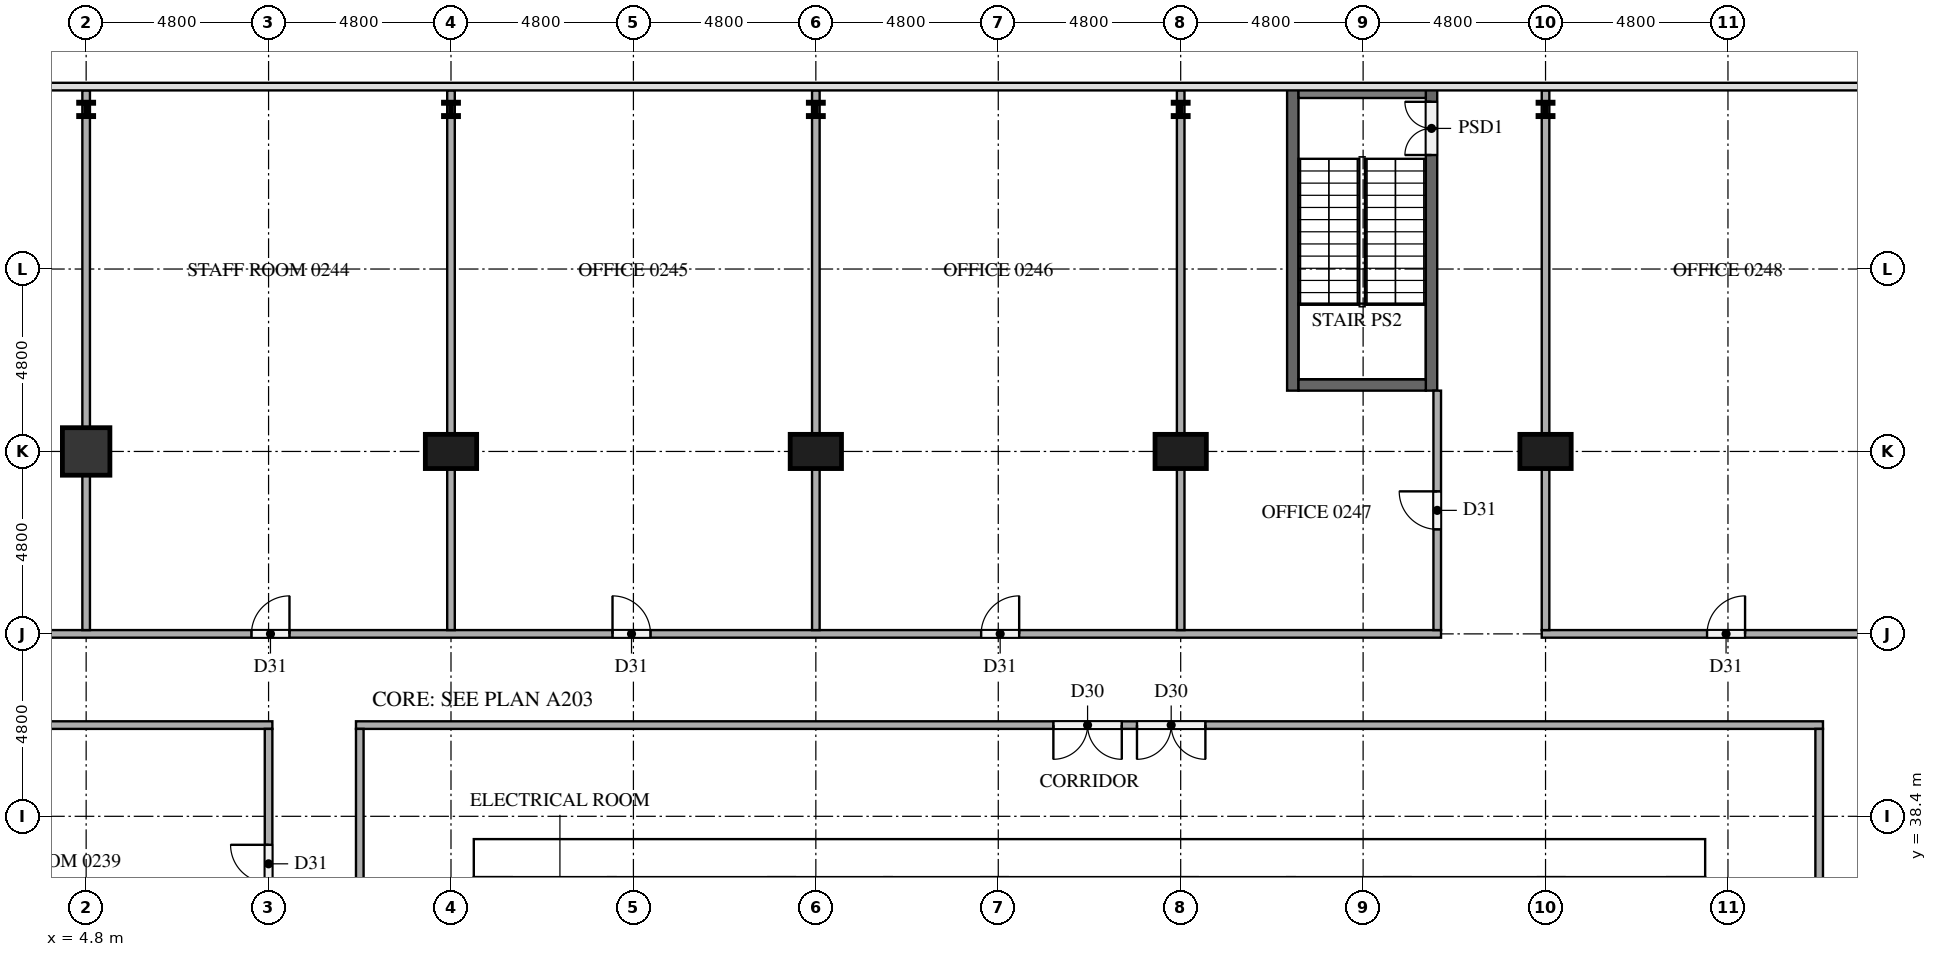
"""IFC4 building model, lengths in metres.
Left out: names, types, materials, properties, quantities, classifications, styles, units other than length and angle.
Written with IfcOpenShell. Run it as: python <this file> out.ifc"""

import sys

from ifc_helpers import new_model, si_unit, direction, frame, frame_2d, origin, origin_2d, place, context, subcontext, project, spatial, rectangle, i_section, extrude, element, fill, save


model = new_model("IFC4")
c1 = context("Model", 3, precision=1e-05, world=origin(), true_north=direction((0.0, 1.0)))
c2 = subcontext(c1, "Body", "Model", "MODEL_VIEW")
j1 = project(units=[si_unit("LENGTHUNIT", "METRE"), si_unit("PLANEANGLEUNIT", "RADIAN")], contexts=[c1])
p1 = place(None, origin())
s1 = spatial("IfcSite", under=j1, at=p1, CompositionType="ELEMENT")
p2 = place(p1, origin())
s2 = spatial("IfcBuilding", under=s1, at=p2, CompositionType="ELEMENT")
p3 = place(p2, frame((0.0, 0.0, 10.5)))
s3 = spatial("IfcBuildingStorey", under=s2, at=p3, CompositionType="ELEMENT", Elevation=10.5)
p4 = place(p3, frame((36.55, 49.6, 0.0), z_axis=(0.0, 0.0, 1.0), x_axis=(0.0, 1.0, 0.0)))
e1 = element("IfcWall", 1, at=p4, inside=s3, PredefinedType="SOLIDWALL", context=c2, shape_type="SweptSolid", body=[
    extrude(rectangle(XDim=8.0, YDim=0.3, at=frame_2d((4.0, 0.0))), origin(), (0.0, 0.0, 1.0), 4.2),
])
p5 = place(p3, frame((40.2, 49.6, 0.0), z_axis=(0.0, 0.0, 1.0), x_axis=(0.0, 1.0, 0.0)))
e2 = element("IfcWall", 2, at=p5, inside=s3, PredefinedType="SOLIDWALL", context=c2, shape_type="SweptSolid", body=[
    extrude(rectangle(XDim=8.0, YDim=0.3, at=frame_2d((4.0, 0.0))), origin(), (0.0, 0.0, 1.0), 4.2),
])
p6 = place(p5, frame((6.2, 0.0, 0.0)))
e3 = element("IfcOpeningElement", 3, at=p6, cuts=e2, PredefinedType="OPENING", context=c2, shape_type="SweptSolid", body=[
    extrude(rectangle(XDim=1.4, YDim=2.1, at=frame_2d((0.7, 1.05))), frame((0.0, 0.16, 0.0), z_axis=(0.0, -1.0, 0.0), x_axis=(1.0, 0.0, 0.0)), (0.0, 0.0, 1.0), 0.32),
])
for number, where, z_axis, x_axis in (
    (4, (36.7, 49.75, 0.0), (0.0, 0.0, 1.0), (1.0, 0.0, 0.0)),
    (5, (36.7, 57.45, 0.0), (0.0, 0.0, 1.0), (1.0, 0.0, 0.0)),
):
    element("IfcWall", number, at=place(p3, frame(where, z_axis=z_axis, x_axis=x_axis)), inside=s3, PredefinedType="SOLIDWALL", context=c2, shape_type="SweptSolid", body=[
        extrude(rectangle(XDim=3.35, YDim=0.3, at=frame_2d((1.675, 0.0))), origin(), (0.0, 0.0, 1.0), 4.2),
    ])
p7 = place(p3, frame((15.0, 37.3, 0.0), z_axis=(0.0, 0.0, 1.0), x_axis=(1.0, 0.0, 0.0)))
e6 = element("IfcWall", 6, at=p7, inside=s3, PredefinedType="SHEAR", context=c2, shape_type="SweptSolid", body=[
    extrude(rectangle(XDim=32.4, YDim=1.0, at=frame_2d((16.2, 0.0))), origin(), (0.0, 0.0, 1.0), 4.2),
])
p8 = place(p7, frame((15.3, 0.0, 0.0)))
e7 = element("IfcOpeningElement", 7, at=p8, cuts=e6, PredefinedType="OPENING", context=c2, shape_type="SweptSolid", body=[
    extrude(rectangle(XDim=1.8, YDim=2.1, at=frame_2d((0.9, 1.05))), frame((0.0, 0.51, 0.0), z_axis=(0.0, -1.0, 0.0), x_axis=(1.0, 0.0, 0.0)), (0.0, 0.0, 1.0), 1.02),
])
p9 = place(p7, frame((1.766, 0.0, 0.0)))
e8 = element("IfcOpeningElement", 8, at=p9, cuts=e6, PredefinedType="OPENING", context=c2, shape_type="SweptSolid", body=[
    extrude(rectangle(XDim=1.0, YDim=2.1, at=frame_2d((0.5, 1.05))), frame((0.0, 0.51, 0.0), z_axis=(0.0, -1.0, 0.0), x_axis=(1.0, 0.0, 0.0)), (0.0, 0.0, 1.0), 1.02),
])
p10 = place(p7, frame((5.241, 0.0, 0.0)))
e9 = element("IfcOpeningElement", 9, at=p10, cuts=e6, PredefinedType="OPENING", context=c2, shape_type="SweptSolid", body=[
    extrude(rectangle(XDim=1.0, YDim=2.1, at=frame_2d((0.5, 1.05))), frame((0.0, 0.51, 0.0), z_axis=(0.0, -1.0, 0.0), x_axis=(1.0, 0.0, 0.0)), (0.0, 0.0, 1.0), 1.02),
])
for number, where, z_axis, x_axis in (
    (10, (28.7, 33.9, 0.0), (0.0, 0.0, 1.0), (0.0, 1.0, 0.0)),
    (11, (33.7, 33.9, 0.0), (0.0, 0.0, 1.0), (0.0, 1.0, 0.0)),
):
    element("IfcWall", number, at=place(p3, frame(where, z_axis=z_axis, x_axis=x_axis)), inside=s3, PredefinedType="SHEAR", context=c2, shape_type="SweptSolid", body=[
        extrude(rectangle(XDim=2.9, YDim=0.7, at=frame_2d((1.45, 0.0))), origin(), (0.0, 0.0, 1.0), 4.2),
    ])
for number, where, z_axis, x_axis in (
    (12, (43.2, 48.0, 0.0), (0.0, 0.0, 1.0), (1.0, 0.0, 0.0)),
    (13, (33.6, 48.0, 0.0), (0.0, 0.0, 1.0), (1.0, 0.0, 0.0)),
    (14, (24.0, 48.0, 0.0), (0.0, 0.0, 1.0), (1.0, 0.0, 0.0)),
    (15, (14.4, 48.0, 0.0), (0.0, 0.0, 1.0), (1.0, 0.0, 0.0)),
):
    element("IfcColumn", number, at=place(p3, frame(where, z_axis=z_axis, x_axis=x_axis)), inside=s3, PredefinedType="COLUMN", context=c2, shape_type="SweptSolid", body=[
        extrude(rectangle(XDim=1.35, YDim=0.9, at=origin_2d()), origin(), (0.0, 0.0, 1.0), 4.2),
    ])
p11 = place(p3, frame((4.8, 48.0, 0.0), z_axis=(0.0, 0.0, 1.0), x_axis=(1.0, 0.0, 0.0)))
e16 = element("IfcColumn", 16, at=p11, inside=s3, PredefinedType="COLUMN", context=c2, shape_type="SweptSolid", body=[
    extrude(rectangle(XDim=1.25, YDim=1.25, at=origin_2d()), origin(), (0.0, 0.0, 1.0), 4.2),
])
for number, where, z_axis, x_axis in (
    (17, (4.8, 57.0, 0.0), (0.0, 0.0, 1.0), (1.0, 0.0, 0.0)),
    (18, (14.4, 57.0, 0.0), (0.0, 0.0, 1.0), (1.0, 0.0, 0.0)),
    (19, (24.0, 57.0, 0.0), (0.0, 0.0, 1.0), (1.0, 0.0, 0.0)),
    (20, (33.6, 57.0, 0.0), (0.0, 0.0, 1.0), (1.0, 0.0, 0.0)),
    (21, (43.2, 57.0, 0.0), (0.0, 0.0, 1.0), (1.0, 0.0, 0.0)),
):
    element("IfcColumn", number, at=place(p3, frame(where, z_axis=z_axis, x_axis=x_axis)), inside=s3, PredefinedType="COLUMN", context=c2, shape_type="SweptSolid", body=[
        extrude(i_section(OverallWidth=0.396, OverallDepth=0.381, WebThickness=0.019, FlangeThickness=0.03, at=origin_2d()), origin(), (0.0, 0.0, 1.0), 4.2),
    ])
for number, where, z_axis, x_axis in (
    (22, (25.9, 33.9, 0.0), (0.0, 0.0, 1.0), (0.0, 1.0, 0.0)),
    (23, (36.5, 33.9, 0.0), (0.0, 0.0, 1.0), (0.0, 1.0, 0.0)),
):
    element("IfcWall", number, at=place(p3, frame(where, z_axis=z_axis, x_axis=x_axis)), inside=s3, PredefinedType="SOLIDWALL", context=c2, shape_type="SweptSolid", body=[
        extrude(rectangle(XDim=2.9, YDim=0.2, at=frame_2d((1.45, 0.0))), origin(), (0.0, 0.0, 1.0), 4.2),
    ])
p12 = place(p3, frame((18.633, 31.6, 0.0), z_axis=(0.0, 0.0, 1.0), x_axis=(0.0, 1.0, 0.0)))
e24 = element("IfcWall", 24, at=p12, inside=s3, PredefinedType="PARTITIONING", context=c2, shape_type="SweptSolid", body=[
    extrude(rectangle(XDim=5.2, YDim=0.2, at=frame_2d((2.6, 0.0))), origin(), (0.0, 0.0, 1.0), 4.2),
])
p13 = place(p3, frame((-4.9, 40.8, 0.0), z_axis=(0.0, 0.0, 1.0), x_axis=(1.0, 0.0, 0.0)))
e25 = element("IfcWall", 25, at=p13, inside=s3, PredefinedType="PARTITIONING", context=c2, shape_type="SweptSolid", body=[
    extrude(rectangle(XDim=14.6, YDim=0.2, at=frame_2d((7.3, 0.0))), origin(), (0.0, 0.0, 1.0), 4.2),
])
p14 = place(p3, frame((50.5, 40.8, 0.0), z_axis=(0.0, 0.0, 1.0), x_axis=(-1.0, 0.0, 0.0)))
e26 = element("IfcWall", 26, at=p14, inside=s3, PredefinedType="PARTITIONING", context=c2, shape_type="SweptSolid", body=[
    extrude(rectangle(XDim=38.6, YDim=0.2, at=frame_2d((19.3, 0.0))), origin(), (0.0, 0.0, 1.0), 4.2),
])
p15 = place(p14, frame((18.45, 0.0, 0.0)))
e27 = element("IfcOpeningElement", 27, at=p15, cuts=e26, PredefinedType="OPENING", context=c2, shape_type="SweptSolid", body=[
    extrude(rectangle(XDim=1.8, YDim=2.1, at=frame_2d((0.9, 1.05))), frame((0.0, 0.11, 0.0), z_axis=(0.0, -1.0, 0.0), x_axis=(1.0, 0.0, 0.0)), (0.0, 0.0, 1.0), 0.22),
])
p16 = place(p14, frame((16.25, 0.0, 0.0)))
e28 = element("IfcOpeningElement", 28, at=p16, cuts=e26, PredefinedType="OPENING", context=c2, shape_type="SweptSolid", body=[
    extrude(rectangle(XDim=1.8, YDim=2.1, at=frame_2d((0.9, 1.05))), frame((0.0, 0.11, 0.0), z_axis=(0.0, -1.0, 0.0), x_axis=(1.0, 0.0, 0.0)), (0.0, 0.0, 1.0), 0.22),
])
p17 = place(p3, frame((-4.9, 43.2, 0.0), z_axis=(0.0, 0.0, 1.0), x_axis=(1.0, 0.0, 0.0)))
e29 = element("IfcWall", 29, at=p17, inside=s3, PredefinedType="PARTITIONING", context=c2, shape_type="SweptSolid", body=[
    extrude(rectangle(XDim=45.35, YDim=0.2, at=frame_2d((22.675, 0.0))), origin(), (0.0, 0.0, 1.0), 4.2),
])
p18 = place(p17, frame((14.05, 0.0, 0.0)))
e30 = element("IfcOpeningElement", 30, at=p18, cuts=e29, PredefinedType="OPENING", context=c2, shape_type="SweptSolid", body=[
    extrude(rectangle(XDim=1.0, YDim=2.1, at=frame_2d((0.5, 1.05))), frame((0.0, 0.11, 0.0), z_axis=(0.0, -1.0, 0.0), x_axis=(1.0, 0.0, 0.0)), (0.0, 0.0, 1.0), 0.22),
])
p19 = place(p17, frame((23.55, 0.0, 0.0)))
e31 = element("IfcOpeningElement", 31, at=p19, cuts=e29, PredefinedType="OPENING", context=c2, shape_type="SweptSolid", body=[
    extrude(rectangle(XDim=1.0, YDim=2.1, at=frame_2d((0.5, 1.05))), frame((0.0, 0.11, 0.0), z_axis=(0.0, -1.0, 0.0), x_axis=(1.0, 0.0, 0.0)), (0.0, 0.0, 1.0), 0.22),
])
p20 = place(p17, frame((33.25, 0.0, 0.0)))
e32 = element("IfcOpeningElement", 32, at=p20, cuts=e29, PredefinedType="OPENING", context=c2, shape_type="SweptSolid", body=[
    extrude(rectangle(XDim=1.0, YDim=2.1, at=frame_2d((0.5, 1.05))), frame((0.0, 0.11, 0.0), z_axis=(0.0, -1.0, 0.0), x_axis=(1.0, 0.0, 0.0)), (0.0, 0.0, 1.0), 0.22),
])
p21 = place(p3, frame((43.1, 43.2, 0.0), z_axis=(0.0, 0.0, 1.0), x_axis=(1.0, 0.0, 0.0)))
e33 = element("IfcWall", 33, at=p21, inside=s3, PredefinedType="PARTITIONING", context=c2, shape_type="SweptSolid", body=[
    extrude(rectangle(XDim=24.2, YDim=0.2, at=frame_2d((12.1, 0.0))), origin(), (0.0, 0.0, 1.0), 4.2),
])
p22 = place(p21, frame((4.35, 0.0, 0.0)))
e34 = element("IfcOpeningElement", 34, at=p22, cuts=e33, PredefinedType="OPENING", context=c2, shape_type="SweptSolid", body=[
    extrude(rectangle(XDim=1.0, YDim=2.1, at=frame_2d((0.5, 1.05))), frame((0.0, 0.11, 0.0), z_axis=(0.0, -1.0, 0.0), x_axis=(1.0, 0.0, 0.0)), (0.0, 0.0, 1.0), 0.22),
])
p23 = place(p21, frame((16.45, 0.0, 0.0)))
e35 = element("IfcOpeningElement", 35, at=p23, cuts=e33, PredefinedType="OPENING", context=c2, shape_type="SweptSolid", body=[
    extrude(rectangle(XDim=1.0, YDim=2.1, at=frame_2d((0.5, 1.05))), frame((0.0, 0.11, 0.0), z_axis=(0.0, -1.0, 0.0), x_axis=(1.0, 0.0, 0.0)), (0.0, 0.0, 1.0), 0.22),
])
p24 = place(p3, frame((4.8, 43.3, 0.0), z_axis=(0.0, 0.0, 1.0), x_axis=(0.0, 1.0, 0.0)))
e36 = element("IfcWall", 36, at=p24, inside=s3, PredefinedType="PARTITIONING", context=c2, shape_type="SweptSolid", body=[
    extrude(rectangle(XDim=14.2, YDim=0.2, at=frame_2d((7.1, 0.0))), origin(), (0.0, 0.0, 1.0), 4.2),
])
p25 = place(p3, frame((9.6, 12.1, 0.0), z_axis=(0.0, 0.0, 1.0), x_axis=(0.0, 1.0, 0.0)))
e37 = element("IfcWall", 37, at=p25, inside=s3, PredefinedType="PARTITIONING", context=c2, shape_type="SweptSolid", body=[
    extrude(rectangle(XDim=28.6, YDim=0.2, at=frame_2d((14.3, 0.0))), origin(), (0.0, 0.0, 1.0), 4.2),
])
p26 = place(p25, frame((16.25, 0.0, 0.0)))
e38 = element("IfcOpeningElement", 38, at=p26, cuts=e37, PredefinedType="OPENING", context=c2, shape_type="SweptSolid", body=[
    extrude(rectangle(XDim=1.0, YDim=2.1, at=frame_2d((0.5, 1.05))), frame((0.0, 0.11, 0.0), z_axis=(0.0, -1.0, 0.0), x_axis=(1.0, 0.0, 0.0)), (0.0, 0.0, 1.0), 0.22),
])
p27 = place(p25, frame((24.55, 0.0, 0.0)))
e39 = element("IfcOpeningElement", 39, at=p27, cuts=e37, PredefinedType="OPENING", context=c2, shape_type="SweptSolid", body=[
    extrude(rectangle(XDim=1.0, YDim=2.1, at=frame_2d((0.5, 1.05))), frame((0.0, 0.11, 0.0), z_axis=(0.0, -1.0, 0.0), x_axis=(1.0, 0.0, 0.0)), (0.0, 0.0, 1.0), 0.22),
])
p28 = place(p3, frame((12.0, 40.7, 0.0), z_axis=(0.0, 0.0, 1.0), x_axis=(0.0, -1.0, 0.0)))
e40 = element("IfcWall", 40, at=p28, inside=s3, PredefinedType="PARTITIONING", context=c2, shape_type="SweptSolid", body=[
    extrude(rectangle(XDim=28.6, YDim=0.2, at=frame_2d((14.3, 0.0))), origin(), (0.0, 0.0, 1.0), 4.2),
])
p29 = place(p28, frame((6.85, 0.0, 0.0)))
e41 = element("IfcOpeningElement", 41, at=p29, cuts=e40, PredefinedType="OPENING", context=c2, shape_type="SweptSolid", body=[
    extrude(rectangle(XDim=1.8, YDim=2.1, at=frame_2d((0.9, 1.05))), frame((0.0, 0.11, 0.0), z_axis=(0.0, -1.0, 0.0), x_axis=(1.0, 0.0, 0.0)), (0.0, 0.0, 1.0), 0.22),
])
for number, where, z_axis, x_axis in (
    (42, (14.4, 43.3, 0.0), (0.0, 0.0, 1.0), (0.0, 1.0, 0.0)),
    (43, (24.0, 43.3, 0.0), (0.0, 0.0, 1.0), (0.0, 1.0, 0.0)),
    (44, (33.6, 43.3, 0.0), (0.0, 0.0, 1.0), (0.0, 1.0, 0.0)),
):
    element("IfcWall", number, at=place(p3, frame(where, z_axis=z_axis, x_axis=x_axis)), inside=s3, PredefinedType="PARTITIONING", context=c2, shape_type="SweptSolid", body=[
        extrude(rectangle(XDim=14.2, YDim=0.2, at=frame_2d((7.1, 0.0))), origin(), (0.0, 0.0, 1.0), 4.2),
    ])
p30 = place(p3, frame((40.35, 43.3, 0.0), z_axis=(0.0, 0.0, 1.0), x_axis=(0.0, 1.0, 0.0)))
e45 = element("IfcWall", 45, at=p30, inside=s3, PredefinedType="PARTITIONING", context=c2, shape_type="SweptSolid", body=[
    extrude(rectangle(XDim=6.3, YDim=0.2, at=frame_2d((3.15, 0.0))), origin(), (0.0, 0.0, 1.0), 4.2),
])
p31 = place(p30, frame((2.65, 0.0, 0.0)))
e46 = element("IfcOpeningElement", 46, at=p31, cuts=e45, PredefinedType="OPENING", context=c2, shape_type="SweptSolid", body=[
    extrude(rectangle(XDim=1.0, YDim=2.1, at=frame_2d((0.5, 1.05))), frame((0.0, 0.11, 0.0), z_axis=(0.0, -1.0, 0.0), x_axis=(1.0, 0.0, 0.0)), (0.0, 0.0, 1.0), 0.22),
])
p32 = place(p3, frame((43.2, 43.3, 0.0), z_axis=(0.0, 0.0, 1.0), x_axis=(0.0, 1.0, 0.0)))
e47 = element("IfcWall", 47, at=p32, inside=s3, PredefinedType="PARTITIONING", context=c2, shape_type="SweptSolid", body=[
    extrude(rectangle(XDim=14.2, YDim=0.2, at=frame_2d((7.1, 0.0))), origin(), (0.0, 0.0, 1.0), 4.2),
])
p33 = place(p3, frame((50.4, 12.1, 0.0), z_axis=(0.0, 0.0, 1.0), x_axis=(0.0, 1.0, 0.0)))
e48 = element("IfcWall", 48, at=p33, inside=s3, PredefinedType="PARTITIONING", context=c2, shape_type="SweptSolid", body=[
    extrude(rectangle(XDim=28.6, YDim=0.2, at=frame_2d((14.3, 0.0))), origin(), (0.0, 0.0, 1.0), 4.2),
])
p34 = place(p33, frame((20.05, 0.0, 0.0)))
e49 = element("IfcOpeningElement", 49, at=p34, cuts=e48, PredefinedType="OPENING", context=c2, shape_type="SweptSolid", body=[
    extrude(rectangle(XDim=1.8, YDim=2.1, at=frame_2d((0.9, 1.05))), frame((0.0, 0.11, 0.0), z_axis=(0.0, -1.0, 0.0), x_axis=(1.0, 0.0, 0.0)), (0.0, 0.0, 1.0), 0.22),
])
p35 = place(p8, origin())
e50 = element("IfcDoor", 50, at=p35, inside=s3, OperationType="DOUBLE_DOOR_SINGLE_SWING", PredefinedType="DOOR", context=c2, shape_type="SweptSolid", body=[
    extrude(rectangle(XDim=1.8, YDim=2.1, at=frame_2d((0.9, 1.05))), frame((0.0, 0.025, 0.0), z_axis=(0.0, -1.0, 0.0), x_axis=(1.0, 0.0, 0.0)), (0.0, 0.0, 1.0), 0.05),
])
fill(e7, e50)
p36 = place(p9, origin())
e51 = element("IfcDoor", 51, at=p36, inside=s3, OperationType="SINGLE_SWING_LEFT", PredefinedType="DOOR", context=c2, shape_type="SweptSolid", body=[
    extrude(rectangle(XDim=1.0, YDim=2.1, at=frame_2d((0.5, 1.05))), frame((0.0, 0.025, 0.0), z_axis=(0.0, -1.0, 0.0), x_axis=(1.0, 0.0, 0.0)), (0.0, 0.0, 1.0), 0.05),
])
fill(e8, e51)
p37 = place(p10, origin())
e52 = element("IfcDoor", 52, at=p37, inside=s3, OperationType="SINGLE_SWING_RIGHT", PredefinedType="DOOR", context=c2, shape_type="SweptSolid", body=[
    extrude(rectangle(XDim=1.0, YDim=2.1, at=frame_2d((0.5, 1.05))), frame((0.0, 0.025, 0.0), z_axis=(0.0, -1.0, 0.0), x_axis=(1.0, 0.0, 0.0)), (0.0, 0.0, 1.0), 0.05),
])
fill(e9, e52)
p38 = place(p6, origin())
e53 = element("IfcDoor", 53, at=p38, inside=s3, OperationType="DOUBLE_DOOR_SINGLE_SWING", PredefinedType="DOOR", context=c2, shape_type="SweptSolid", body=[
    extrude(rectangle(XDim=1.4, YDim=2.1, at=frame_2d((0.7, 1.05))), frame((0.0, 0.025, 0.0), z_axis=(0.0, -1.0, 0.0), x_axis=(1.0, 0.0, 0.0)), (0.0, 0.0, 1.0), 0.05),
])
fill(e3, e53)
p39 = place(p15, origin())
e54 = element("IfcDoor", 54, at=p39, inside=s3, OperationType="DOUBLE_DOOR_SINGLE_SWING", PredefinedType="DOOR", context=c2, shape_type="SweptSolid", body=[
    extrude(rectangle(XDim=1.8, YDim=2.1, at=frame_2d((0.9, 1.05))), frame((0.0, 0.025, 0.0), z_axis=(0.0, -1.0, 0.0), x_axis=(1.0, 0.0, 0.0)), (0.0, 0.0, 1.0), 0.05),
])
fill(e27, e54)
p40 = place(p27, origin())
e55 = element("IfcDoor", 55, at=p40, inside=s3, OperationType="SINGLE_SWING_RIGHT", PredefinedType="DOOR", context=c2, shape_type="SweptSolid", body=[
    extrude(rectangle(XDim=1.0, YDim=2.1, at=frame_2d((0.5, 1.05))), frame((0.0, 0.025, 0.0), z_axis=(0.0, -1.0, 0.0), x_axis=(1.0, 0.0, 0.0)), (0.0, 0.0, 1.0), 0.05),
])
fill(e39, e55)
p41 = place(p18, origin())
e56 = element("IfcDoor", 56, at=p41, inside=s3, OperationType="SINGLE_SWING_RIGHT", PredefinedType="DOOR", context=c2, shape_type="SweptSolid", body=[
    extrude(rectangle(XDim=1.0, YDim=2.1, at=frame_2d((0.5, 1.05))), frame((0.0, 0.025, 0.0), z_axis=(0.0, -1.0, 0.0), x_axis=(1.0, 0.0, 0.0)), (0.0, 0.0, 1.0), 0.05),
])
fill(e30, e56)
p42 = place(p19, origin())
e57 = element("IfcDoor", 57, at=p42, inside=s3, OperationType="SINGLE_SWING_LEFT", PredefinedType="DOOR", context=c2, shape_type="SweptSolid", body=[
    extrude(rectangle(XDim=1.0, YDim=2.1, at=frame_2d((0.5, 1.05))), frame((0.0, 0.025, 0.0), z_axis=(0.0, -1.0, 0.0), x_axis=(1.0, 0.0, 0.0)), (0.0, 0.0, 1.0), 0.05),
])
fill(e31, e57)
p43 = place(p20, origin())
e58 = element("IfcDoor", 58, at=p43, inside=s3, OperationType="SINGLE_SWING_RIGHT", PredefinedType="DOOR", context=c2, shape_type="SweptSolid", body=[
    extrude(rectangle(XDim=1.0, YDim=2.1, at=frame_2d((0.5, 1.05))), frame((0.0, 0.025, 0.0), z_axis=(0.0, -1.0, 0.0), x_axis=(1.0, 0.0, 0.0)), (0.0, 0.0, 1.0), 0.05),
])
fill(e32, e58)
p44 = place(p31, origin())
e59 = element("IfcDoor", 59, at=p44, inside=s3, OperationType="SINGLE_SWING_RIGHT", PredefinedType="DOOR", context=c2, shape_type="SweptSolid", body=[
    extrude(rectangle(XDim=1.0, YDim=2.1, at=frame_2d((0.5, 1.05))), frame((0.0, 0.025, 0.0), z_axis=(0.0, -1.0, 0.0), x_axis=(1.0, 0.0, 0.0)), (0.0, 0.0, 1.0), 0.05),
])
fill(e46, e59)
p45 = place(p22, origin())
e60 = element("IfcDoor", 60, at=p45, inside=s3, OperationType="SINGLE_SWING_RIGHT", PredefinedType="DOOR", context=c2, shape_type="SweptSolid", body=[
    extrude(rectangle(XDim=1.0, YDim=2.1, at=frame_2d((0.5, 1.05))), frame((0.0, 0.025, 0.0), z_axis=(0.0, -1.0, 0.0), x_axis=(1.0, 0.0, 0.0)), (0.0, 0.0, 1.0), 0.05),
])
fill(e34, e60)
p46 = place(p16, origin())
e61 = element("IfcDoor", 61, at=p46, inside=s3, OperationType="DOUBLE_DOOR_SINGLE_SWING", PredefinedType="DOOR", context=c2, shape_type="SweptSolid", body=[
    extrude(rectangle(XDim=1.8, YDim=2.1, at=frame_2d((0.9, 1.05))), frame((0.0, 0.025, 0.0), z_axis=(0.0, -1.0, 0.0), x_axis=(1.0, 0.0, 0.0)), (0.0, 0.0, 1.0), 0.05),
])
fill(e28, e61)
save(model, sys.argv[1])
